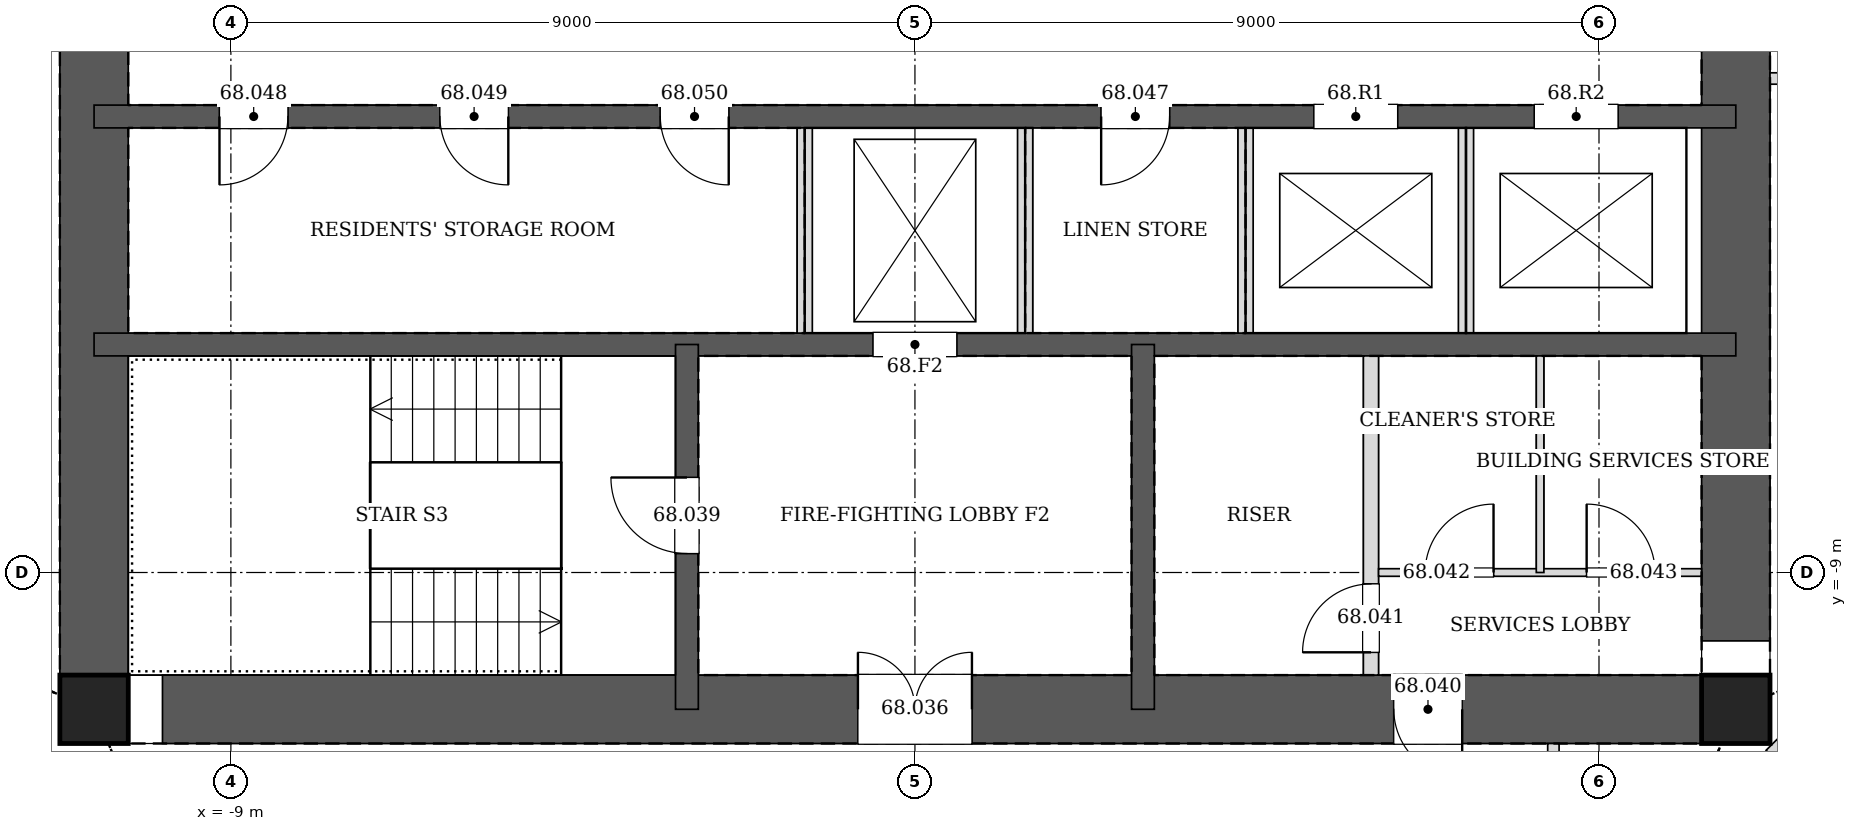
"""IFC4 building model, lengths in metres.
Left out: names, types, materials, properties, quantities, classifications, styles, units other than length and angle.
Written with IfcOpenShell. Run it as: python <this file> out.ifc"""

import sys

from ifc_helpers import new_model, si_unit, direction, frame, frame_2d, origin, origin_2d, place, context, subcontext, project, spatial, rectangle, hollow_rectangle, extrude, element, fill, save


model = new_model("IFC4")
c1 = context("Model", 3, precision=1e-05, world=origin(), true_north=direction((0.0, 1.0)))
c2 = subcontext(c1, "Body", "Model", "MODEL_VIEW")
j1 = project(units=[si_unit("LENGTHUNIT", "METRE"), si_unit("PLANEANGLEUNIT", "RADIAN")], contexts=[c1])
p1 = place(None, origin())
s1 = spatial("IfcSite", under=j1, at=p1, CompositionType="ELEMENT")
p2 = place(p1, origin())
s2 = spatial("IfcBuilding", under=s1, at=p2, CompositionType="ELEMENT")
p3 = place(p2, frame((0.0, 0.0, 281.0)))
s3 = spatial("IfcBuildingStorey", under=s2, at=p3, CompositionType="ELEMENT", Elevation=281.0)
for number, where, z_axis, x_axis in (
    (1, (-10.8, -10.8, 0.0), (0.0, 0.0, 1.0), (1.0, 0.0, 0.0)),
    (2, (10.8, -10.8, 0.0), (0.0, 0.0, 1.0), (1.0, 0.0, 0.0)),
):
    element("IfcColumn", number, at=place(p3, frame(where, z_axis=z_axis, x_axis=x_axis)), inside=s3, PredefinedType="COLUMN", context=c2, shape_type="SweptSolid", body=[
        extrude(hollow_rectangle(XDim=0.9, YDim=0.9, WallThickness=0.04, at=origin_2d()), origin(), (0.0, 0.0, 1.0), 3.4),
    ])
p4 = place(p3, frame((-10.8, -10.8, 0.0), z_axis=(0.0, 0.0, 1.0), x_axis=(1.0, 0.0, 0.0)))
e3 = element("IfcWall", 3, at=p4, inside=s3, PredefinedType="SOLIDWALL", context=c2, shape_type="SweptSolid", body=[
    extrude(rectangle(XDim=21.6, YDim=0.9, at=frame_2d((10.8, 0.0))), origin(), (0.0, 0.0, 1.0), 3.4),
])
p5 = place(p4, frame((10.05, 0.0, 0.0)))
e4 = element("IfcOpeningElement", 4, at=p5, cuts=e3, PredefinedType="OPENING", context=c2, shape_type="SweptSolid", body=[
    extrude(rectangle(XDim=1.5, YDim=2.1, at=frame_2d((0.75, 1.05))), frame((0.0, 0.46, 0.0), z_axis=(0.0, -1.0, 0.0), x_axis=(1.0, 0.0, 0.0)), (0.0, 0.0, 1.0), 0.92),
])
p6 = place(p4, frame((17.1, 0.0, 0.0)))
e5 = element("IfcOpeningElement", 5, at=p6, cuts=e3, PredefinedType="OPENING", context=c2, shape_type="SweptSolid", body=[
    extrude(rectangle(XDim=0.9, YDim=2.1, at=frame_2d((0.45, 1.05))), frame((0.0, 0.46, 0.0), z_axis=(0.0, -1.0, 0.0), x_axis=(1.0, 0.0, 0.0)), (0.0, 0.0, 1.0), 0.92),
])
p7 = place(p3, frame((10.8, -10.8, 0.0), z_axis=(0.0, 0.0, 1.0), x_axis=(0.0, 1.0, 0.0)))
e6 = element("IfcWall", 6, at=p7, inside=s3, PredefinedType="SOLIDWALL", context=c2, shape_type="SweptSolid", body=[
    extrude(rectangle(XDim=21.6, YDim=0.9, at=frame_2d((10.8, 0.0))), origin(), (0.0, 0.0, 1.0), 3.4),
])
p8 = place(p7, frame((11.7, 0.0, 0.0)))
e7 = element("IfcOpeningElement", 7, at=p8, cuts=e6, PredefinedType="OPENING", context=c2, shape_type="SweptSolid", body=[
    extrude(rectangle(XDim=1.2, YDim=2.1, at=frame_2d((0.6, 1.05))), frame((0.0, 0.46, 0.0), z_axis=(0.0, -1.0, 0.0), x_axis=(1.0, 0.0, 0.0)), (0.0, 0.0, 1.0), 0.92),
])
p9 = place(p7, frame((8.7, 0.0, 0.0)))
e8 = element("IfcOpeningElement", 8, at=p9, cuts=e6, PredefinedType="OPENING", context=c2, shape_type="SweptSolid", body=[
    extrude(rectangle(XDim=1.2, YDim=2.1, at=frame_2d((0.6, 1.05))), frame((0.0, 0.46, 0.0), z_axis=(0.0, -1.0, 0.0), x_axis=(1.0, 0.0, 0.0)), (0.0, 0.0, 1.0), 0.92),
])
p10 = place(p3, frame((-10.8, 10.8, 0.0), z_axis=(0.0, 0.0, 1.0), x_axis=(0.0, -1.0, 0.0)))
e9 = element("IfcWall", 9, at=p10, inside=s3, PredefinedType="SOLIDWALL", context=c2, shape_type="SweptSolid", body=[
    extrude(rectangle(XDim=21.6, YDim=0.9, at=frame_2d((10.8, 0.0))), origin(), (0.0, 0.0, 1.0), 3.4),
])
p11 = place(p10, frame((8.7, 0.0, 0.0)))
e10 = element("IfcOpeningElement", 10, at=p11, cuts=e9, PredefinedType="OPENING", context=c2, shape_type="SweptSolid", body=[
    extrude(rectangle(XDim=1.2, YDim=2.1, at=frame_2d((0.6, 1.05))), frame((0.0, 0.46, 0.0), z_axis=(0.0, -1.0, 0.0), x_axis=(1.0, 0.0, 0.0)), (0.0, 0.0, 1.0), 0.92),
])
p12 = place(p10, frame((11.7, 0.0, 0.0)))
e11 = element("IfcOpeningElement", 11, at=p12, cuts=e9, PredefinedType="OPENING", context=c2, shape_type="SweptSolid", body=[
    extrude(rectangle(XDim=1.2, YDim=2.1, at=frame_2d((0.6, 1.05))), frame((0.0, 0.46, 0.0), z_axis=(0.0, -1.0, 0.0), x_axis=(1.0, 0.0, 0.0)), (0.0, 0.0, 1.0), 0.92),
])
p13 = place(p3, frame((-10.8, -3.0, 0.0), z_axis=(0.0, 0.0, 1.0), x_axis=(1.0, 0.0, 0.0)))
e12 = element("IfcWall", 12, at=p13, inside=s3, PredefinedType="SOLIDWALL", context=c2, shape_type="SweptSolid", body=[
    extrude(rectangle(XDim=21.6, YDim=0.3, at=frame_2d((10.8, 0.0))), origin(), (0.0, 0.0, 1.0), 3.4),
])
p14 = place(p13, frame((13.25, 0.0, 0.0)))
e13 = element("IfcOpeningElement", 13, at=p14, cuts=e12, PredefinedType="OPENING", context=c2, shape_type="SweptSolid", body=[
    extrude(rectangle(XDim=0.9, YDim=2.1, at=frame_2d((0.45, 1.05))), frame((0.0, 0.16, 0.0), z_axis=(0.0, -1.0, 0.0), x_axis=(1.0, 0.0, 0.0)), (0.0, 0.0, 1.0), 0.32),
])
p15 = place(p13, frame((1.65, 0.0, 0.0)))
e14 = element("IfcOpeningElement", 14, at=p15, cuts=e12, PredefinedType="OPENING", context=c2, shape_type="SweptSolid", body=[
    extrude(rectangle(XDim=0.9, YDim=2.1, at=frame_2d((0.45, 1.05))), frame((0.0, 0.16, 0.0), z_axis=(0.0, -1.0, 0.0), x_axis=(1.0, 0.0, 0.0)), (0.0, 0.0, 1.0), 0.32),
])
p16 = place(p13, frame((4.55, 0.0, 0.0)))
e15 = element("IfcOpeningElement", 15, at=p16, cuts=e12, PredefinedType="OPENING", context=c2, shape_type="SweptSolid", body=[
    extrude(rectangle(XDim=0.9, YDim=2.1, at=frame_2d((0.45, 1.05))), frame((0.0, 0.16, 0.0), z_axis=(0.0, -1.0, 0.0), x_axis=(1.0, 0.0, 0.0)), (0.0, 0.0, 1.0), 0.32),
])
p17 = place(p13, frame((7.45, 0.0, 0.0)))
e16 = element("IfcOpeningElement", 16, at=p17, cuts=e12, PredefinedType="OPENING", context=c2, shape_type="SweptSolid", body=[
    extrude(rectangle(XDim=0.9, YDim=2.1, at=frame_2d((0.45, 1.05))), frame((0.0, 0.16, 0.0), z_axis=(0.0, -1.0, 0.0), x_axis=(1.0, 0.0, 0.0)), (0.0, 0.0, 1.0), 0.32),
])
p18 = place(p13, frame((16.05, 0.0, 0.0)))
e17 = element("IfcOpeningElement", 17, at=p18, cuts=e12, PredefinedType="OPENING", context=c2, shape_type="SweptSolid", body=[
    extrude(rectangle(XDim=1.1, YDim=2.1, at=frame_2d((0.55, 1.05))), frame((0.0, 0.16, 0.0), z_axis=(0.0, -1.0, 0.0), x_axis=(1.0, 0.0, 0.0)), (0.0, 0.0, 1.0), 0.32),
])
p19 = place(p13, frame((18.95, 0.0, 0.0)))
e18 = element("IfcOpeningElement", 18, at=p19, cuts=e12, PredefinedType="OPENING", context=c2, shape_type="SweptSolid", body=[
    extrude(rectangle(XDim=1.1, YDim=2.1, at=frame_2d((0.55, 1.05))), frame((0.0, 0.16, 0.0), z_axis=(0.0, -1.0, 0.0), x_axis=(1.0, 0.0, 0.0)), (0.0, 0.0, 1.0), 0.32),
])
p20 = place(p3, frame((-10.8, -6.0, 0.0), z_axis=(0.0, 0.0, 1.0), x_axis=(1.0, 0.0, 0.0)))
e19 = element("IfcWall", 19, at=p20, inside=s3, PredefinedType="SOLIDWALL", context=c2, shape_type="SweptSolid", body=[
    extrude(rectangle(XDim=21.6, YDim=0.3, at=frame_2d((10.8, 0.0))), origin(), (0.0, 0.0, 1.0), 3.4),
])
p21 = place(p20, frame((10.25, 0.0, 0.0)))
e20 = element("IfcOpeningElement", 20, at=p21, cuts=e19, PredefinedType="OPENING", context=c2, shape_type="SweptSolid", body=[
    extrude(rectangle(XDim=1.1, YDim=2.1, at=frame_2d((0.55, 1.05))), frame((0.0, 0.16, 0.0), z_axis=(0.0, -1.0, 0.0), x_axis=(1.0, 0.0, 0.0)), (0.0, 0.0, 1.0), 0.32),
])
p22 = place(p3, frame((-3.0, -6.0, 0.0), z_axis=(0.0, 0.0, 1.0), x_axis=(0.0, -1.0, 0.0)))
e21 = element("IfcWall", 21, at=p22, inside=s3, PredefinedType="SOLIDWALL", context=c2, shape_type="SweptSolid", body=[
    extrude(rectangle(XDim=4.8, YDim=0.3, at=frame_2d((2.4, 0.0))), origin(), (0.0, 0.0, 1.0), 3.4),
])
p23 = place(p22, frame((1.75, 0.0, 0.0)))
e22 = element("IfcOpeningElement", 22, at=p23, cuts=e21, PredefinedType="OPENING", context=c2, shape_type="SweptSolid", body=[
    extrude(rectangle(XDim=1.0, YDim=2.1, at=frame_2d((0.5, 1.05))), frame((0.0, 0.16, 0.0), z_axis=(0.0, -1.0, 0.0), x_axis=(1.0, 0.0, 0.0)), (0.0, 0.0, 1.0), 0.32),
])
p24 = place(p3, frame((3.0, -6.0, 0.0), z_axis=(0.0, 0.0, 1.0), x_axis=(0.0, -1.0, 0.0)))
e23 = element("IfcWall", 23, at=p24, inside=s3, PredefinedType="SOLIDWALL", context=c2, shape_type="SweptSolid", body=[
    extrude(rectangle(XDim=4.8, YDim=0.3, at=frame_2d((2.4, 0.0))), origin(), (0.0, 0.0, 1.0), 3.4),
])
p25 = place(p3, frame((11.25, -2.5, 0.0), z_axis=(0.0, 0.0, 1.0), x_axis=(1.0, 0.0, 0.0)))
e24 = element("IfcWall", 24, at=p25, inside=s3, PredefinedType="PARTITIONING", context=c2, shape_type="SweptSolid", body=[
    extrude(rectangle(XDim=1.8, YDim=0.15, at=frame_2d((0.9, 0.0))), origin(), (0.0, 0.0, 1.0), 3.2),
])
p26 = place(p3, frame((8.4, -13.05, 0.0), z_axis=(0.0, 0.0, 1.0), x_axis=(0.0, 1.0, 0.0)))
e25 = element("IfcWall", 25, at=p26, inside=s3, PredefinedType="PARTITIONING", context=c2, shape_type="SweptSolid", body=[
    extrude(rectangle(XDim=1.8, YDim=0.15, at=frame_2d((0.9, 0.0))), origin(), (0.0, 0.0, 1.0), 3.2),
])
p27 = place(p26, frame((0.425, 0.0, 0.0)))
e26 = element("IfcOpeningElement", 26, at=p27, cuts=e25, PredefinedType="OPENING", context=c2, shape_type="SweptSolid", body=[
    extrude(rectangle(XDim=0.95, YDim=2.1, at=frame_2d((0.475, 1.05))), frame((0.0, 0.085, 0.0), z_axis=(0.0, -1.0, 0.0), x_axis=(1.0, 0.0, 0.0)), (0.0, 0.0, 1.0), 0.17),
])
p28 = place(p3, frame((11.269, -11.269, 0.0), z_axis=(0.0, 0.0, 1.0), x_axis=(0.707106781187, -0.707106781187, 0.0)))
e27 = element("IfcWall", 27, at=p28, inside=s3, PredefinedType="PARTITIONING", context=c2, shape_type="SweptSolid", body=[
    extrude(rectangle(XDim=2.52, YDim=0.2, at=frame_2d((1.26, 0.0))), origin(), (0.0, 0.0, 1.0), 2.591),
])
for number, where, z_axis, x_axis in (
    (28, (-1.45, -5.85, 0.0), (0.0, 0.0, 1.0), (0.0, 1.0, 0.0)),
    (29, (1.45, -5.85, 0.0), (0.0, 0.0, 1.0), (0.0, 1.0, 0.0)),
    (30, (4.35, -5.85, 0.0), (0.0, 0.0, 1.0), (0.0, 1.0, 0.0)),
):
    element("IfcWall", number, at=place(p3, frame(where, z_axis=z_axis, x_axis=x_axis)), inside=s3, PredefinedType="PARTITIONING", context=c2, shape_type="SweptSolid", body=[
        extrude(rectangle(XDim=2.7, YDim=0.2, at=frame_2d((1.35, 0.0))), origin(), (0.0, 0.0, 1.0), 3.2),
    ])
p29 = place(p3, frame((7.25, -5.85, 0.0), z_axis=(0.0, 0.0, 1.0), x_axis=(0.0, 1.0, 0.0)))
e31 = element("IfcWall", 31, at=p29, inside=s3, PredefinedType="PARTITIONING", context=c2, shape_type="SweptSolid", body=[
    extrude(rectangle(XDim=2.7, YDim=0.2, at=frame_2d((1.35, 0.0))), origin(), (0.0, 0.0, 1.0), 3.4),
])
p30 = place(p3, frame((6.0, -10.35, 0.0), z_axis=(0.0, 0.0, 1.0), x_axis=(0.0, 1.0, 0.0)))
e32 = element("IfcWall", 32, at=p30, inside=s3, PredefinedType="PARTITIONING", context=c2, shape_type="SweptSolid", body=[
    extrude(rectangle(XDim=4.2, YDim=0.2, at=frame_2d((2.1, 0.0))), origin(), (0.0, 0.0, 1.0), 3.2),
])
p31 = place(p30, frame((0.3, 0.0, 0.0)))
e33 = element("IfcOpeningElement", 33, at=p31, cuts=e32, PredefinedType="OPENING", context=c2, shape_type="SweptSolid", body=[
    extrude(rectangle(XDim=0.9, YDim=2.1, at=frame_2d((0.45, 1.05))), frame((0.0, 0.11, 0.0), z_axis=(0.0, -1.0, 0.0), x_axis=(1.0, 0.0, 0.0)), (0.0, 0.0, 1.0), 0.22),
])
p32 = place(p3, frame((6.1, -9.0, 0.0), z_axis=(0.0, 0.0, 1.0), x_axis=(1.0, 0.0, 0.0)))
e34 = element("IfcWall", 34, at=p32, inside=s3, PredefinedType="PARTITIONING", context=c2, shape_type="SweptSolid", body=[
    extrude(rectangle(XDim=4.25, YDim=0.1, at=frame_2d((2.125, 0.0))), origin(), (0.0, 0.0, 1.0), 3.2),
])
p33 = place(p32, frame((0.613, 0.0, 0.0)))
e35 = element("IfcOpeningElement", 35, at=p33, cuts=e34, PredefinedType="OPENING", context=c2, shape_type="SweptSolid", body=[
    extrude(rectangle(XDim=0.9, YDim=2.1, at=frame_2d((0.45, 1.05))), frame((0.0, 0.06, 0.0), z_axis=(0.0, -1.0, 0.0), x_axis=(1.0, 0.0, 0.0)), (0.0, 0.0, 1.0), 0.12),
])
p34 = place(p32, frame((2.738, 0.0, 0.0)))
e36 = element("IfcOpeningElement", 36, at=p34, cuts=e34, PredefinedType="OPENING", context=c2, shape_type="SweptSolid", body=[
    extrude(rectangle(XDim=0.9, YDim=2.1, at=frame_2d((0.45, 1.05))), frame((0.0, 0.06, 0.0), z_axis=(0.0, -1.0, 0.0), x_axis=(1.0, 0.0, 0.0)), (0.0, 0.0, 1.0), 0.12),
])
p35 = place(p3, frame((8.225, -9.0, 0.0), z_axis=(0.0, 0.0, 1.0), x_axis=(0.0, 1.0, 0.0)))
e37 = element("IfcWall", 37, at=p35, inside=s3, PredefinedType="PARTITIONING", context=c2, shape_type="SweptSolid", body=[
    extrude(rectangle(XDim=2.85, YDim=0.1, at=frame_2d((1.425, 0.0))), origin(), (0.0, 0.0, 1.0), 3.2),
])
p36 = place(p5, origin())
e38 = element("IfcDoor", 38, at=p36, inside=s3, OperationType="DOUBLE_DOOR_SINGLE_SWING", PredefinedType="DOOR", context=c2, shape_type="SweptSolid", body=[
    extrude(rectangle(XDim=1.5, YDim=2.1, at=frame_2d((0.75, 1.05))), frame((0.0, 0.025, 0.0), z_axis=(0.0, -1.0, 0.0), x_axis=(1.0, 0.0, 0.0)), (0.0, 0.0, 1.0), 0.05),
])
fill(e4, e38)
p37 = place(p23, frame((1.0, 0.0, 0.0), z_axis=(0.0, 0.0, 1.0), x_axis=(-1.0, 0.0, 0.0)))
e39 = element("IfcDoor", 39, at=p37, inside=s3, OperationType="SINGLE_SWING_RIGHT", PredefinedType="DOOR", context=c2, shape_type="SweptSolid", body=[
    extrude(rectangle(XDim=1.0, YDim=2.1, at=frame_2d((0.5, 1.05))), frame((0.0, 0.025, 0.0), z_axis=(0.0, -1.0, 0.0), x_axis=(1.0, 0.0, 0.0)), (0.0, 0.0, 1.0), 0.05),
])
fill(e22, e39)
p38 = place(p6, frame((0.9, 0.0, 0.0), z_axis=(0.0, 0.0, 1.0), x_axis=(-1.0, 0.0, 0.0)))
e40 = element("IfcDoor", 40, at=p38, inside=s3, OperationType="SINGLE_SWING_LEFT", PredefinedType="DOOR", context=c2, shape_type="SweptSolid", body=[
    extrude(rectangle(XDim=0.9, YDim=2.1, at=frame_2d((0.45, 1.05))), frame((0.0, 0.025, 0.0), z_axis=(0.0, -1.0, 0.0), x_axis=(1.0, 0.0, 0.0)), (0.0, 0.0, 1.0), 0.05),
])
fill(e5, e40)
p39 = place(p31, origin())
e41 = element("IfcDoor", 41, at=p39, inside=s3, OperationType="SINGLE_SWING_LEFT", PredefinedType="DOOR", context=c2, shape_type="SweptSolid", body=[
    extrude(rectangle(XDim=0.9, YDim=2.1, at=frame_2d((0.45, 1.05))), frame((0.0, 0.025, 0.0), z_axis=(0.0, -1.0, 0.0), x_axis=(1.0, 0.0, 0.0)), (0.0, 0.0, 1.0), 0.05),
])
fill(e33, e41)
p40 = place(p33, origin())
e42 = element("IfcDoor", 42, at=p40, inside=s3, OperationType="SINGLE_SWING_RIGHT", PredefinedType="DOOR", context=c2, shape_type="SweptSolid", body=[
    extrude(rectangle(XDim=0.9, YDim=2.1, at=frame_2d((0.45, 1.05))), frame((0.0, 0.025, 0.0), z_axis=(0.0, -1.0, 0.0), x_axis=(1.0, 0.0, 0.0)), (0.0, 0.0, 1.0), 0.05),
])
fill(e35, e42)
p41 = place(p34, origin())
e43 = element("IfcDoor", 43, at=p41, inside=s3, OperationType="SINGLE_SWING_LEFT", PredefinedType="DOOR", context=c2, shape_type="SweptSolid", body=[
    extrude(rectangle(XDim=0.9, YDim=2.1, at=frame_2d((0.45, 1.05))), frame((0.0, 0.025, 0.0), z_axis=(0.0, -1.0, 0.0), x_axis=(1.0, 0.0, 0.0)), (0.0, 0.0, 1.0), 0.05),
])
fill(e36, e43)
p42 = place(p14, frame((0.9, 0.0, 0.0), z_axis=(0.0, 0.0, 1.0), x_axis=(-1.0, 0.0, 0.0)))
e44 = element("IfcDoor", 44, at=p42, inside=s3, OperationType="SINGLE_SWING_RIGHT", PredefinedType="DOOR", context=c2, shape_type="SweptSolid", body=[
    extrude(rectangle(XDim=0.9, YDim=2.1, at=frame_2d((0.45, 1.05))), frame((0.0, 0.025, 0.0), z_axis=(0.0, -1.0, 0.0), x_axis=(1.0, 0.0, 0.0)), (0.0, 0.0, 1.0), 0.05),
])
fill(e13, e44)
p43 = place(p15, frame((0.9, 0.0, 0.0), z_axis=(0.0, 0.0, 1.0), x_axis=(-1.0, 0.0, 0.0)))
e45 = element("IfcDoor", 45, at=p43, inside=s3, OperationType="SINGLE_SWING_RIGHT", PredefinedType="DOOR", context=c2, shape_type="SweptSolid", body=[
    extrude(rectangle(XDim=0.9, YDim=2.1, at=frame_2d((0.45, 1.05))), frame((0.0, 0.025, 0.0), z_axis=(0.0, -1.0, 0.0), x_axis=(1.0, 0.0, 0.0)), (0.0, 0.0, 1.0), 0.05),
])
fill(e14, e45)
p44 = place(p16, frame((0.9, 0.0, 0.0), z_axis=(0.0, 0.0, 1.0), x_axis=(-1.0, 0.0, 0.0)))
e46 = element("IfcDoor", 46, at=p44, inside=s3, OperationType="SINGLE_SWING_LEFT", PredefinedType="DOOR", context=c2, shape_type="SweptSolid", body=[
    extrude(rectangle(XDim=0.9, YDim=2.1, at=frame_2d((0.45, 1.05))), frame((0.0, 0.025, 0.0), z_axis=(0.0, -1.0, 0.0), x_axis=(1.0, 0.0, 0.0)), (0.0, 0.0, 1.0), 0.05),
])
fill(e15, e46)
p45 = place(p17, frame((0.9, 0.0, 0.0), z_axis=(0.0, 0.0, 1.0), x_axis=(-1.0, 0.0, 0.0)))
e47 = element("IfcDoor", 47, at=p45, inside=s3, OperationType="SINGLE_SWING_LEFT", PredefinedType="DOOR", context=c2, shape_type="SweptSolid", body=[
    extrude(rectangle(XDim=0.9, YDim=2.1, at=frame_2d((0.45, 1.05))), frame((0.0, 0.025, 0.0), z_axis=(0.0, -1.0, 0.0), x_axis=(1.0, 0.0, 0.0)), (0.0, 0.0, 1.0), 0.05),
])
fill(e16, e47)
p46 = place(p21, origin())
e48 = element("IfcDoor", 48, at=p46, inside=s3, OperationType="DOUBLE_DOOR_SLIDING", PredefinedType="DOOR", context=c2, shape_type="SweptSolid", body=[
    extrude(rectangle(XDim=1.1, YDim=2.1, at=frame_2d((0.55, 1.05))), frame((0.0, 0.025, 0.0), z_axis=(0.0, -1.0, 0.0), x_axis=(1.0, 0.0, 0.0)), (0.0, 0.0, 1.0), 0.05),
])
fill(e20, e48)
p47 = place(p18, origin())
e49 = element("IfcDoor", 49, at=p47, inside=s3, OperationType="DOUBLE_DOOR_SLIDING", PredefinedType="DOOR", context=c2, shape_type="SweptSolid", body=[
    extrude(rectangle(XDim=1.1, YDim=2.1, at=frame_2d((0.55, 1.05))), frame((0.0, 0.025, 0.0), z_axis=(0.0, -1.0, 0.0), x_axis=(1.0, 0.0, 0.0)), (0.0, 0.0, 1.0), 0.05),
])
fill(e17, e49)
p48 = place(p19, origin())
e50 = element("IfcDoor", 50, at=p48, inside=s3, OperationType="DOUBLE_DOOR_SLIDING", PredefinedType="DOOR", context=c2, shape_type="SweptSolid", body=[
    extrude(rectangle(XDim=1.1, YDim=2.1, at=frame_2d((0.55, 1.05))), frame((0.0, 0.025, 0.0), z_axis=(0.0, -1.0, 0.0), x_axis=(1.0, 0.0, 0.0)), (0.0, 0.0, 1.0), 0.05),
])
fill(e18, e50)
save(model, sys.argv[1])
